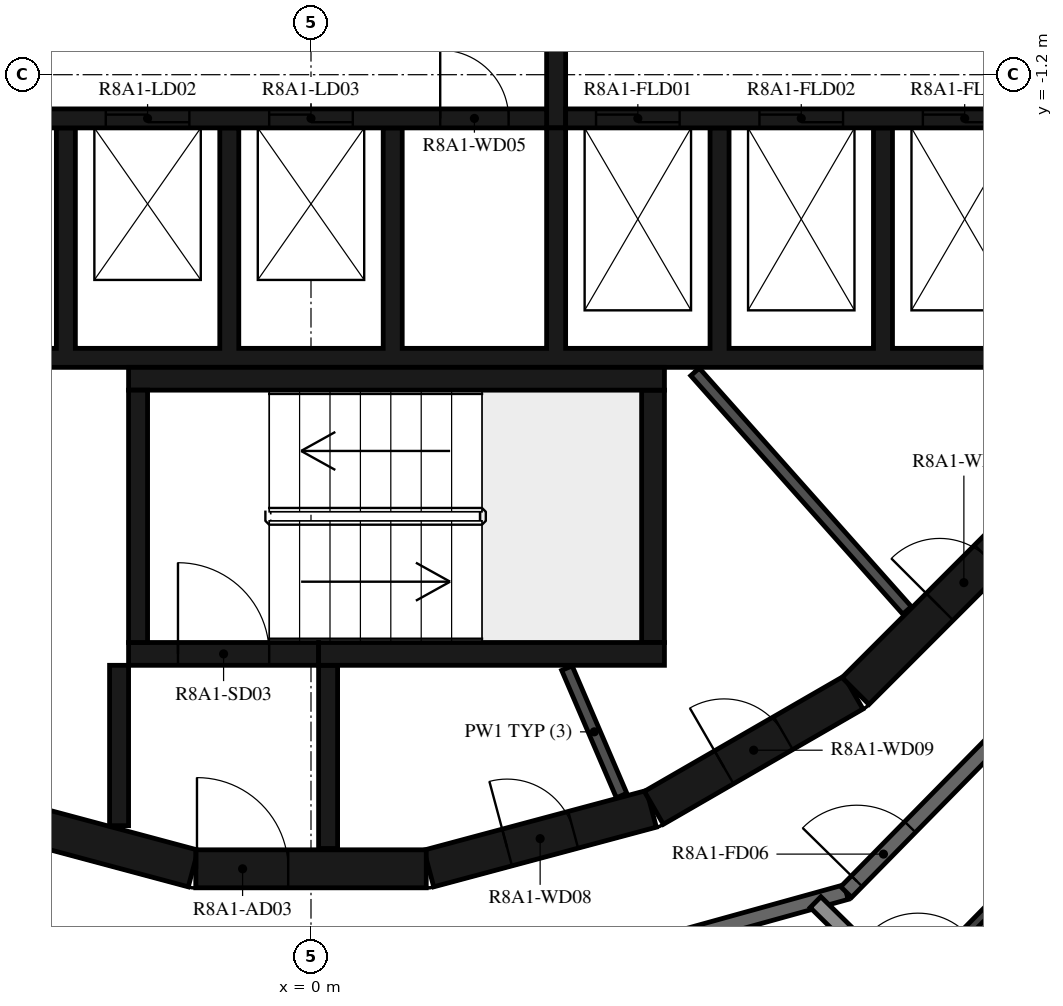
"""IFC4 building model, lengths in metres.
Left out: names, types, materials, properties, quantities, classifications, styles, units other than length and angle.
Written with IfcOpenShell. Run it as: python <this file> out.ifc"""

import sys

from ifc_helpers import new_model, si_unit, direction, frame, frame_2d, origin, place, context, subcontext, project, spatial, polyline, rectangle, outline, extrude, element, fill, save


model = new_model("IFC4")
c1 = context("Model", 3, precision=1e-05, world=origin(), true_north=direction((0.0, 1.0)))
c2 = subcontext(c1, "Body", "Model", "MODEL_VIEW")
j1 = project(units=[si_unit("LENGTHUNIT", "METRE"), si_unit("PLANEANGLEUNIT", "RADIAN")], contexts=[c1])
p1 = place(None, origin())
s1 = spatial("IfcSite", under=j1, at=p1, CompositionType="ELEMENT")
p2 = place(p1, origin())
s2 = spatial("IfcBuilding", under=s1, at=p2, CompositionType="ELEMENT")
p3 = place(p2, frame((0.0, 0.0, 301.7)))
s3 = spatial("IfcBuildingStorey", under=s2, at=p3, CompositionType="ELEMENT", Elevation=301.7)
p4 = place(p3, frame((1.55, -11.643, 0.0), z_axis=(0.0, 0.0, 1.0), x_axis=(0.965948410781, 0.258734743916, 0.0)))
e1 = element("IfcWall", 1, at=p4, inside=s3, PredefinedType="SHEAR", context=c2, shape_type="SweptSolid", body=[
    extrude(rectangle(XDim=3.033, YDim=0.5, at=frame_2d((1.516, 0.0))), origin(), (0.0, 0.0, 1.0), 3.12),
])
p5 = place(p4, frame((1.066, 0.0, 0.0)))
e2 = element("IfcOpeningElement", 2, at=p5, cuts=e1, PredefinedType="OPENING", context=c2, shape_type="SweptSolid", body=[
    extrude(rectangle(XDim=0.9, YDim=2.1, at=frame_2d((0.45, 1.05))), frame((0.0, 0.26, 0.0), z_axis=(0.0, -1.0, 0.0), x_axis=(1.0, 0.0, 0.0)), (0.0, 0.0, 1.0), 0.52),
])
p6 = place(p3, frame((4.51, -10.845, 0.0), z_axis=(0.0, 0.0, 1.0), x_axis=(0.865975092491, 0.500087131594, 0.0)))
e3 = element("IfcWall", 3, at=p6, inside=s3, PredefinedType="SHEAR", context=c2, shape_type="SweptSolid", body=[
    extrude(rectangle(XDim=3.033, YDim=0.5, at=frame_2d((1.516, 0.0))), origin(), (0.0, 0.0, 1.0), 3.12),
])
p7 = place(p6, frame((1.066, 0.0, 0.0)))
e4 = element("IfcOpeningElement", 4, at=p7, cuts=e3, PredefinedType="OPENING", context=c2, shape_type="SweptSolid", body=[
    extrude(rectangle(XDim=0.9, YDim=2.1, at=frame_2d((0.45, 1.05))), frame((0.0, 0.26, 0.0), z_axis=(0.0, -1.0, 0.0), x_axis=(1.0, 0.0, 0.0)), (0.0, 0.0, 1.0), 0.52),
])
p8 = place(p3, frame((7.164, -9.308, 0.0), z_axis=(0.0, 0.0, 1.0), x_axis=(0.707106781187, 0.707106781187, 0.0)))
e5 = element("IfcWall", 5, at=p8, inside=s3, PredefinedType="SHEAR", context=c2, shape_type="SweptSolid", body=[
    extrude(rectangle(XDim=3.032, YDim=0.5, at=frame_2d((1.516, 0.0))), origin(), (0.0, 0.0, 1.0), 3.12),
])
p9 = place(p8, frame((1.566, 0.0, 0.0)))
e6 = element("IfcOpeningElement", 6, at=p9, cuts=e5, PredefinedType="OPENING", context=c2, shape_type="SweptSolid", body=[
    extrude(rectangle(XDim=0.9, YDim=2.1, at=frame_2d((0.45, 1.05))), frame((0.0, 0.26, 0.0), z_axis=(0.0, -1.0, 0.0), x_axis=(1.0, 0.0, 0.0)), (0.0, 0.0, 1.0), 0.52),
])
p10 = place(p3, frame((-4.479, -10.858, 0.0), z_axis=(0.0, 0.0, 1.0), x_axis=(0.965948410781, -0.258734743916, 0.0)))
e7 = element("IfcWall", 7, at=p10, inside=s3, PredefinedType="SHEAR", context=c2, shape_type="SweptSolid", body=[
    extrude(rectangle(XDim=3.033, YDim=0.5, at=frame_2d((1.516, 0.0))), origin(), (0.0, 0.0, 1.0), 3.12),
])
p11 = place(p3, frame((-1.516, -11.647, 0.0), z_axis=(0.0, 0.0, 1.0), x_axis=(1.0, 0.0, 0.0)))
e8 = element("IfcWall", 8, at=p11, inside=s3, PredefinedType="SHEAR", context=c2, shape_type="SweptSolid", body=[
    extrude(rectangle(XDim=3.033, YDim=0.5, at=frame_2d((1.516, 0.0))), origin(), (0.0, 0.0, 1.0), 3.12),
])
p12 = place(p11, frame((0.016, 0.0, 0.0)))
e9 = element("IfcOpeningElement", 9, at=p12, cuts=e8, PredefinedType="OPENING", context=c2, shape_type="SweptSolid", body=[
    extrude(rectangle(XDim=1.2, YDim=2.1, at=frame_2d((0.6, 1.05))), frame((0.0, 0.26, 0.0), z_axis=(0.0, -1.0, 0.0), x_axis=(1.0, 0.0, 0.0)), (0.0, 0.0, 1.0), 0.52),
])
p13 = place(p3, frame((-2.275, -8.67, 0.0), z_axis=(0.0, 0.0, 1.0), x_axis=(0.0, 1.0, 0.0)))
e10 = element("IfcWall", 10, at=p13, inside=s3, PredefinedType="SHEAR", context=c2, shape_type="SweptSolid", body=[
    extrude(rectangle(XDim=3.32, YDim=0.25, at=frame_2d((1.66, 0.0))), origin(), (0.0, 0.0, 1.0), 3.12),
])
p14 = place(p3, frame((-2.4, -5.2, 0.0), z_axis=(0.0, 0.0, 1.0), x_axis=(1.0, 0.0, 0.0)))
e11 = element("IfcWall", 11, at=p14, inside=s3, PredefinedType="SHEAR", context=c2, shape_type="SweptSolid", body=[
    extrude(rectangle(XDim=7.05, YDim=0.3, at=frame_2d((3.525, 0.0))), origin(), (0.0, 0.0, 1.0), 3.12),
])
p15 = place(p3, frame((4.5, -8.67, 0.0), z_axis=(0.0, 0.0, 1.0), x_axis=(0.0, 1.0, 0.0)))
e12 = element("IfcWall", 12, at=p15, inside=s3, PredefinedType="SHEAR", context=c2, shape_type="SweptSolid", body=[
    extrude(rectangle(XDim=3.32, YDim=0.3, at=frame_2d((1.66, 0.0))), origin(), (0.0, 0.0, 1.0), 3.12),
])
p16 = place(p3, frame((0.1, -8.82, 0.0), z_axis=(0.0, 0.0, 1.0), x_axis=(1.0, 0.0, 0.0)))
e13 = element("IfcWall", 13, at=p16, inside=s3, PredefinedType="SHEAR", context=c2, shape_type="SweptSolid", body=[
    extrude(rectangle(XDim=4.55, YDim=0.3, at=frame_2d((2.275, 0.0))), origin(), (0.0, 0.0, 1.0), 3.12),
])
p17 = place(p3, frame((-2.4, -8.82, 0.0), z_axis=(0.0, 0.0, 1.0), x_axis=(1.0, 0.0, 0.0)))
e14 = element("IfcWall", 14, at=p17, inside=s3, PredefinedType="SHEAR", context=c2, shape_type="SweptSolid", body=[
    extrude(rectangle(XDim=2.5, YDim=0.3, at=frame_2d((1.25, 0.0))), origin(), (0.0, 0.0, 1.0), 3.12),
])
p18 = place(p17, frame((0.65, 0.0, 0.0)))
e15 = element("IfcOpeningElement", 15, at=p18, cuts=e14, PredefinedType="OPENING", context=c2, shape_type="SweptSolid", body=[
    extrude(rectangle(XDim=1.2, YDim=2.1, at=frame_2d((0.6, 1.05))), frame((0.0, 0.16, 0.0), z_axis=(0.0, -1.0, 0.0), x_axis=(1.0, 0.0, 0.0)), (0.0, 0.0, 1.0), 0.32),
])
p19 = place(p3, frame((-2.525, -8.97, 0.0), z_axis=(0.0, 0.0, 1.0), x_axis=(0.0, -1.0, 0.0)))
e16 = element("IfcWall", 16, at=p19, inside=s3, PredefinedType="SHEAR", context=c2, shape_type="SweptSolid", body=[
    extrude(rectangle(XDim=2.11, YDim=0.25, at=frame_2d((1.055, 0.0))), origin(), (0.0, 0.0, 1.0), 3.12),
])
p20 = place(p3, frame((0.225, -8.97, 0.0), z_axis=(0.0, 0.0, 1.0), x_axis=(0.0, -1.0, 0.0)))
e17 = element("IfcWall", 17, at=p20, inside=s3, PredefinedType="SHEAR", context=c2, shape_type="SweptSolid", body=[
    extrude(rectangle(XDim=2.41, YDim=0.25, at=frame_2d((1.205, 0.0))), origin(), (0.0, 0.0, 1.0), 3.12),
])
p21 = place(p3, origin())
e18 = element("IfcWall", 18, at=p21, inside=s3, PredefinedType="SHEAR", context=c2, shape_type="SweptSolid", body=[
    extrude(outline(polyline([(9.8, -5.05), (9.8, -4.8), (9.8, -1.9), (9.55, -1.9), (9.55, -4.8), (7.65, -4.8), (7.65, -1.9), (7.4, -1.9), (7.4, -4.8), (5.5, -4.8), (5.5, -1.9), (5.25, -1.9), (5.25, -4.8), (3.35, -4.8), (3.35, -1.9), (3.1, -1.9), (3.1, -4.8), (1.2, -4.8), (1.2, -1.9), (0.95, -1.9), (0.95, -4.8), (-0.95, -4.8), (-0.95, -1.9), (-1.2, -1.9), (-1.2, -4.8), (-3.1, -4.8), (-3.1, -1.9), (-3.35, -1.9), (-3.35, -4.8), (-5.25, -4.8), (-5.25, -1.9), (-5.5, -1.9), (-5.5, -4.8), (-9.55, -4.8), (-9.55, -1.9), (-9.8, -1.9), (-9.8, -4.8), (-9.8, -5.05), (9.8, -5.05)])), origin(), (0.0, 0.0, 1.0), 3.12),
])
p22 = place(p3, frame((-11.28, -1.775, 0.0), z_axis=(0.0, 0.0, 1.0), x_axis=(1.0, 0.0, 0.0)))
e19 = element("IfcWall", 19, at=p22, inside=s3, PredefinedType="SHEAR", context=c2, shape_type="SweptSolid", body=[
    extrude(rectangle(XDim=14.38, YDim=0.25, at=frame_2d((7.19, 0.0))), origin(), (0.0, 0.0, 1.0), 3.12),
])
p23 = place(p22, frame((6.43, 0.0, 0.0)))
e20 = element("IfcOpeningElement", 20, at=p23, cuts=e19, PredefinedType="OPENING", context=c2, shape_type="SweptSolid", body=[
    extrude(rectangle(XDim=1.1, YDim=2.1, at=frame_2d((0.55, 1.05))), frame((0.0, 0.135, 0.0), z_axis=(0.0, -1.0, 0.0), x_axis=(1.0, 0.0, 0.0)), (0.0, 0.0, 1.0), 0.27),
])
p24 = place(p22, frame((8.58, 0.0, 0.0)))
e21 = element("IfcOpeningElement", 21, at=p24, cuts=e19, PredefinedType="OPENING", context=c2, shape_type="SweptSolid", body=[
    extrude(rectangle(XDim=1.1, YDim=2.1, at=frame_2d((0.55, 1.05))), frame((0.0, 0.135, 0.0), z_axis=(0.0, -1.0, 0.0), x_axis=(1.0, 0.0, 0.0)), (0.0, 0.0, 1.0), 0.27),
])
p25 = place(p22, frame((10.73, 0.0, 0.0)))
e22 = element("IfcOpeningElement", 22, at=p25, cuts=e19, PredefinedType="OPENING", context=c2, shape_type="SweptSolid", body=[
    extrude(rectangle(XDim=1.1, YDim=2.1, at=frame_2d((0.55, 1.05))), frame((0.0, 0.135, 0.0), z_axis=(0.0, -1.0, 0.0), x_axis=(1.0, 0.0, 0.0)), (0.0, 0.0, 1.0), 0.27),
])
p26 = place(p22, frame((3.305, 0.0, 0.0)))
e23 = element("IfcOpeningElement", 23, at=p26, cuts=e19, PredefinedType="OPENING", context=c2, shape_type="SweptSolid", body=[
    extrude(rectangle(XDim=0.9, YDim=2.1, at=frame_2d((0.45, 1.05))), frame((0.0, 0.135, 0.0), z_axis=(0.0, -1.0, 0.0), x_axis=(1.0, 0.0, 0.0)), (0.0, 0.0, 1.0), 0.27),
])
p27 = place(p22, frame((12.98, 0.0, 0.0)))
e24 = element("IfcOpeningElement", 24, at=p27, cuts=e19, PredefinedType="OPENING", context=c2, shape_type="SweptSolid", body=[
    extrude(rectangle(XDim=0.9, YDim=2.1, at=frame_2d((0.45, 1.05))), frame((0.0, 0.135, 0.0), z_axis=(0.0, -1.0, 0.0), x_axis=(1.0, 0.0, 0.0)), (0.0, 0.0, 1.0), 0.27),
])
p28 = place(p3, frame((3.35, -1.775, 0.0), z_axis=(0.0, 0.0, 1.0), x_axis=(1.0, 0.0, 0.0)))
e25 = element("IfcWall", 25, at=p28, inside=s3, PredefinedType="SHEAR", context=c2, shape_type="SweptSolid", body=[
    extrude(rectangle(XDim=7.93, YDim=0.25, at=frame_2d((3.965, 0.0))), origin(), (0.0, 0.0, 1.0), 3.12),
])
p29 = place(p28, frame((0.4, 0.0, 0.0)))
e26 = element("IfcOpeningElement", 26, at=p29, cuts=e25, PredefinedType="OPENING", context=c2, shape_type="SweptSolid", body=[
    extrude(rectangle(XDim=1.1, YDim=2.4, at=frame_2d((0.55, 1.2))), frame((0.0, 0.135, 0.0), z_axis=(0.0, -1.0, 0.0), x_axis=(1.0, 0.0, 0.0)), (0.0, 0.0, 1.0), 0.27),
])
p30 = place(p28, frame((2.55, 0.0, 0.0)))
e27 = element("IfcOpeningElement", 27, at=p30, cuts=e25, PredefinedType="OPENING", context=c2, shape_type="SweptSolid", body=[
    extrude(rectangle(XDim=1.1, YDim=2.4, at=frame_2d((0.55, 1.2))), frame((0.0, 0.135, 0.0), z_axis=(0.0, -1.0, 0.0), x_axis=(1.0, 0.0, 0.0)), (0.0, 0.0, 1.0), 0.27),
])
p31 = place(p28, frame((4.7, 0.0, 0.0)))
e28 = element("IfcOpeningElement", 28, at=p31, cuts=e25, PredefinedType="OPENING", context=c2, shape_type="SweptSolid", body=[
    extrude(rectangle(XDim=1.1, YDim=2.4, at=frame_2d((0.55, 1.2))), frame((0.0, 0.135, 0.0), z_axis=(0.0, -1.0, 0.0), x_axis=(1.0, 0.0, 0.0)), (0.0, 0.0, 1.0), 0.27),
])
p32 = place(p3, frame((3.225, -1.9, 0.0), z_axis=(0.0, 0.0, 1.0), x_axis=(0.0, 1.0, 0.0)))
e29 = element("IfcWall", 29, at=p32, inside=s3, PredefinedType="SHEAR", context=c2, shape_type="SweptSolid", body=[
    extrude(rectangle(XDim=3.8, YDim=0.25, at=frame_2d((1.9, 0.0))), origin(), (0.0, 0.0, 1.0), 3.12),
])
p33 = place(p3, frame((7.842, -8.248, 0.0), z_axis=(0.0, 0.0, 1.0), x_axis=(-0.66446128181, 0.747322691329, 0.0)))
e30 = element("IfcWall", 30, at=p33, inside=s3, PredefinedType="PARTITIONING", context=c2, shape_type="SweptSolid", body=[
    extrude(rectangle(XDim=4.198, YDim=0.15, at=frame_2d((2.099, 0.0))), origin(), (0.0, 0.0, 1.0), 3.12),
])
p34 = place(p3, frame((3.367, -9.007, 0.0), z_axis=(0.0, 0.0, 1.0), x_axis=(0.394387482265, -0.918944238696, 0.0)))
e31 = element("IfcWall", 31, at=p34, inside=s3, PredefinedType="PARTITIONING", context=c2, shape_type="SweptSolid", body=[
    extrude(rectangle(XDim=1.825, YDim=0.15, at=frame_2d((0.913, 0.0))), origin(), (0.0, 0.0, 1.0), 3.12),
])
p35 = place(p3, frame((-6.831, -12.074, 0.0), z_axis=(0.0, 0.0, 1.0), x_axis=(0.968144780225, -0.250391063186, 0.0)))
e32 = element("IfcWall", 32, at=p35, inside=s3, PredefinedType="STANDARD", context=c2, shape_type="SweptSolid", body=[
    extrude(rectangle(XDim=7.181, YDim=0.2, at=frame_2d((3.591, 0.0))), origin(), (0.0, 0.0, 1.0), 3.12),
])
p36 = place(p35, frame((2.39, 0.0, 0.0)))
e33 = element("IfcOpeningElement", 33, at=p36, cuts=e32, PredefinedType="OPENING", context=c2, shape_type="SweptSolid", body=[
    extrude(rectangle(XDim=1.0, YDim=2.1, at=frame_2d((0.5, 1.05))), frame((0.0, 0.11, 0.0), z_axis=(0.0, -1.0, 0.0), x_axis=(1.0, 0.0, 0.0)), (0.0, 0.0, 1.0), 0.22),
])
p37 = place(p35, frame((5.69, 0.0, 0.0)))
e34 = element("IfcOpeningElement", 34, at=p37, cuts=e32, PredefinedType="OPENING", context=c2, shape_type="SweptSolid", body=[
    extrude(rectangle(XDim=1.0, YDim=2.1, at=frame_2d((0.5, 1.05))), frame((0.0, 0.11, 0.0), z_axis=(0.0, -1.0, 0.0), x_axis=(1.0, 0.0, 0.0)), (0.0, 0.0, 1.0), 0.22),
])
p38 = place(p3, frame((0.121, -13.872, 0.0), z_axis=(0.0, 0.0, 1.0), x_axis=(0.963625960674, 0.267254575108, 0.0)))
e35 = element("IfcWall", 35, at=p38, inside=s3, PredefinedType="STANDARD", context=c2, shape_type="SweptSolid", body=[
    extrude(rectangle(XDim=7.181, YDim=0.2, at=frame_2d((3.591, 0.0))), origin(), (0.0, 0.0, 1.0), 3.12),
])
p39 = place(p3, frame((7.041, -11.953, 0.0), z_axis=(0.0, 0.0, 1.0), x_axis=(0.70090916255, 0.713250549143, 0.0)))
e36 = element("IfcWall", 36, at=p39, inside=s3, PredefinedType="STANDARD", context=c2, shape_type="SweptSolid", body=[
    extrude(rectangle(XDim=7.181, YDim=0.2, at=frame_2d((3.59, 0.0))), origin(), (0.0, 0.0, 1.0), 3.12),
])
p40 = place(p39, frame((0.2, 0.0, 0.0)))
e37 = element("IfcOpeningElement", 37, at=p40, cuts=e36, PredefinedType="OPENING", context=c2, shape_type="SweptSolid", body=[
    extrude(rectangle(XDim=1.0, YDim=2.1, at=frame_2d((0.5, 1.05))), frame((0.0, 0.11, 0.0), z_axis=(0.0, -1.0, 0.0), x_axis=(1.0, 0.0, 0.0)), (0.0, 0.0, 1.0), 0.22),
])
p41 = place(p3, frame((9.462, -14.861, 0.0), z_axis=(0.0, 0.0, 1.0), x_axis=(-0.713276937124, 0.700882308927, 0.0)))
e38 = element("IfcWall", 38, at=p41, inside=s3, PredefinedType="STANDARD", context=c2, shape_type="SweptSolid", body=[
    extrude(rectangle(XDim=3.959, YDim=0.2, at=frame_2d((1.979, 0.0))), origin(), (0.0, 0.0, 1.0), 2.73),
])
p42 = place(p3, frame((7.846, -13.273, 0.0), z_axis=(0.0, 0.0, 1.0), x_axis=(0.700911018066, 0.713248725728, 0.0)))
e39 = element("IfcWall", 39, at=p42, inside=s3, PredefinedType="PARTITIONING", context=c2, shape_type="SweptSolid", body=[
    extrude(rectangle(XDim=7.935, YDim=0.12, at=frame_2d((3.968, 0.0))), origin(), (0.0, 0.0, 1.0), 3.12),
])
p43 = place(p42, frame((0.2, 0.0, 0.0)))
e40 = element("IfcOpeningElement", 40, at=p43, cuts=e39, PredefinedType="OPENING", context=c2, shape_type="SweptSolid", body=[
    extrude(rectangle(XDim=0.9, YDim=2.1, at=frame_2d((0.45, 1.05))), frame((0.0, 0.07, 0.0), z_axis=(0.0, -1.0, 0.0), x_axis=(1.0, 0.0, 0.0)), (0.0, 0.0, 1.0), 0.14),
])
p44 = place(p18, origin())
e41 = element("IfcDoor", 41, at=p44, inside=s3, OperationType="SINGLE_SWING_LEFT", PredefinedType="DOOR", context=c2, shape_type="SweptSolid", body=[
    extrude(rectangle(XDim=1.2, YDim=2.1, at=frame_2d((0.6, 1.05))), frame((0.0, 0.025, 0.0), z_axis=(0.0, -1.0, 0.0), x_axis=(1.0, 0.0, 0.0)), (0.0, 0.0, 1.0), 0.05),
])
fill(e15, e41)
p45 = place(p12, origin())
e42 = element("IfcDoor", 42, at=p45, inside=s3, OperationType="SINGLE_SWING_RIGHT", PredefinedType="DOOR", context=c2, shape_type="SweptSolid", body=[
    extrude(rectangle(XDim=1.2, YDim=2.1, at=frame_2d((0.6, 1.05))), frame((0.0, 0.025, 0.0), z_axis=(0.0, -1.0, 0.0), x_axis=(1.0, 0.0, 0.0)), (0.0, 0.0, 1.0), 0.05),
])
fill(e9, e42)
p46 = place(p24, origin())
e43 = element("IfcDoor", 43, at=p46, inside=s3, OperationType="DOUBLE_DOOR_SLIDING", PredefinedType="DOOR", context=c2, shape_type="SweptSolid", body=[
    extrude(rectangle(XDim=1.1, YDim=2.1, at=frame_2d((0.55, 1.05))), frame((0.0, 0.025, 0.0), z_axis=(0.0, -1.0, 0.0), x_axis=(1.0, 0.0, 0.0)), (0.0, 0.0, 1.0), 0.05),
])
fill(e21, e43)
p47 = place(p25, origin())
e44 = element("IfcDoor", 44, at=p47, inside=s3, OperationType="DOUBLE_DOOR_SLIDING", PredefinedType="DOOR", context=c2, shape_type="SweptSolid", body=[
    extrude(rectangle(XDim=1.1, YDim=2.1, at=frame_2d((0.55, 1.05))), frame((0.0, 0.025, 0.0), z_axis=(0.0, -1.0, 0.0), x_axis=(1.0, 0.0, 0.0)), (0.0, 0.0, 1.0), 0.05),
])
fill(e22, e44)
p48 = place(p29, origin())
e45 = element("IfcDoor", 45, at=p48, inside=s3, OperationType="DOUBLE_DOOR_SLIDING", PredefinedType="DOOR", context=c2, shape_type="SweptSolid", body=[
    extrude(rectangle(XDim=1.1, YDim=2.4, at=frame_2d((0.55, 1.2))), frame((0.0, 0.025, 0.0), z_axis=(0.0, -1.0, 0.0), x_axis=(1.0, 0.0, 0.0)), (0.0, 0.0, 1.0), 0.05),
])
fill(e26, e45)
p49 = place(p30, origin())
e46 = element("IfcDoor", 46, at=p49, inside=s3, OperationType="DOUBLE_DOOR_SLIDING", PredefinedType="DOOR", context=c2, shape_type="SweptSolid", body=[
    extrude(rectangle(XDim=1.1, YDim=2.4, at=frame_2d((0.55, 1.2))), frame((0.0, 0.025, 0.0), z_axis=(0.0, -1.0, 0.0), x_axis=(1.0, 0.0, 0.0)), (0.0, 0.0, 1.0), 0.05),
])
fill(e27, e46)
p50 = place(p31, origin())
e47 = element("IfcDoor", 47, at=p50, inside=s3, OperationType="DOUBLE_DOOR_SLIDING", PredefinedType="DOOR", context=c2, shape_type="SweptSolid", body=[
    extrude(rectangle(XDim=1.1, YDim=2.4, at=frame_2d((0.55, 1.2))), frame((0.0, 0.025, 0.0), z_axis=(0.0, -1.0, 0.0), x_axis=(1.0, 0.0, 0.0)), (0.0, 0.0, 1.0), 0.05),
])
fill(e28, e47)
p51 = place(p27, origin())
e48 = element("IfcDoor", 48, at=p51, inside=s3, OperationType="SINGLE_SWING_LEFT", PredefinedType="DOOR", context=c2, shape_type="SweptSolid", body=[
    extrude(rectangle(XDim=0.9, YDim=2.1, at=frame_2d((0.45, 1.05))), frame((0.0, 0.025, 0.0), z_axis=(0.0, -1.0, 0.0), x_axis=(1.0, 0.0, 0.0)), (0.0, 0.0, 1.0), 0.05),
])
fill(e24, e48)
p52 = place(p9, origin())
e49 = element("IfcDoor", 49, at=p52, inside=s3, OperationType="SINGLE_SWING_LEFT", PredefinedType="DOOR", context=c2, shape_type="SweptSolid", body=[
    extrude(rectangle(XDim=0.9, YDim=2.1, at=frame_2d((0.45, 1.05))), frame((0.0, 0.025, 0.0), z_axis=(0.0, -1.0, 0.0), x_axis=(1.0, 0.0, 0.0)), (0.0, 0.0, 1.0), 0.05),
])
fill(e6, e49)
p53 = place(p5, origin())
e50 = element("IfcDoor", 50, at=p53, inside=s3, OperationType="SINGLE_SWING_RIGHT", PredefinedType="DOOR", context=c2, shape_type="SweptSolid", body=[
    extrude(rectangle(XDim=0.9, YDim=2.1, at=frame_2d((0.45, 1.05))), frame((0.0, 0.025, 0.0), z_axis=(0.0, -1.0, 0.0), x_axis=(1.0, 0.0, 0.0)), (0.0, 0.0, 1.0), 0.05),
])
fill(e2, e50)
p54 = place(p7, origin())
e51 = element("IfcDoor", 51, at=p54, inside=s3, OperationType="SINGLE_SWING_LEFT", PredefinedType="DOOR", context=c2, shape_type="SweptSolid", body=[
    extrude(rectangle(XDim=0.9, YDim=2.1, at=frame_2d((0.45, 1.05))), frame((0.0, 0.025, 0.0), z_axis=(0.0, -1.0, 0.0), x_axis=(1.0, 0.0, 0.0)), (0.0, 0.0, 1.0), 0.05),
])
fill(e4, e51)
p55 = place(p40, origin())
e52 = element("IfcDoor", 52, at=p55, inside=s3, OperationType="SINGLE_SWING_LEFT", PredefinedType="DOOR", context=c2, shape_type="SweptSolid", body=[
    extrude(rectangle(XDim=1.0, YDim=2.1, at=frame_2d((0.5, 1.05))), frame((0.0, 0.025, 0.0), z_axis=(0.0, -1.0, 0.0), x_axis=(1.0, 0.0, 0.0)), (0.0, 0.0, 1.0), 0.05),
])
fill(e37, e52)
save(model, sys.argv[1])
